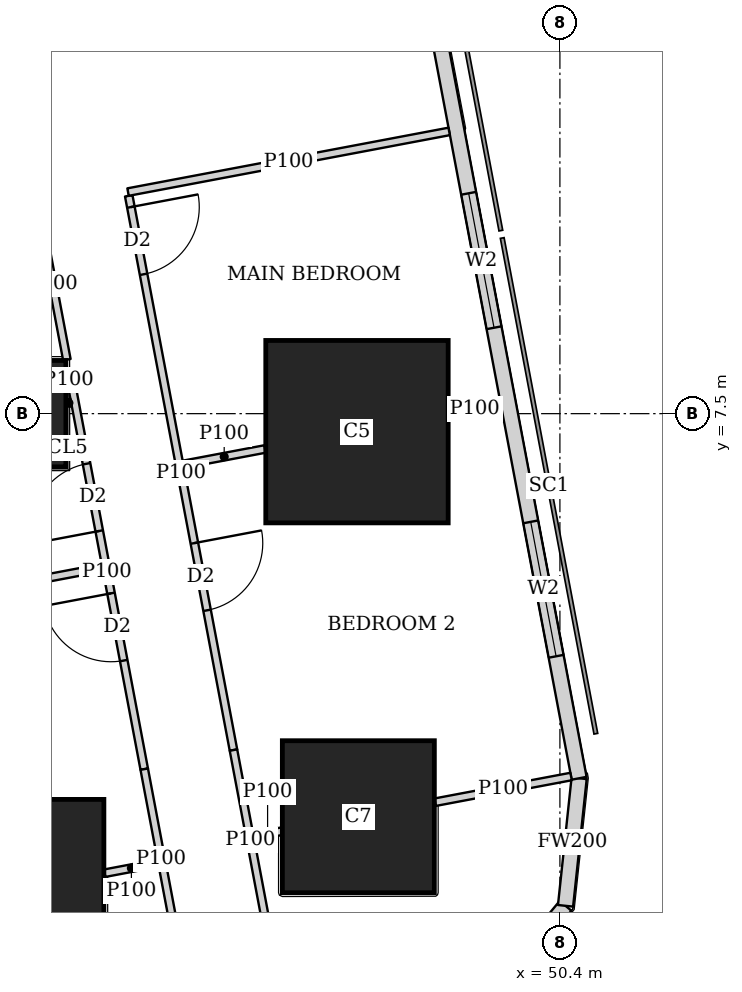
"""IFC4 building model, lengths in metres.
Left out: names, types, materials, properties, quantities, classifications, styles, units other than length and angle.
Written with IfcOpenShell. Run it as: python <this file> out.ifc"""

import sys

from ifc_helpers import new_model, si_unit, direction, frame, frame_2d, origin, origin_2d, place, context, subcontext, project, spatial, rectangle, extrude, element, fill, save


model = new_model("IFC4")
c1 = context("Model", 3, precision=1e-05, world=origin(), true_north=direction((0.0, 1.0)))
c2 = subcontext(c1, "Body", "Model", "MODEL_VIEW")
j1 = project(units=[si_unit("LENGTHUNIT", "METRE"), si_unit("PLANEANGLEUNIT", "RADIAN")], contexts=[c1])
p1 = place(None, origin())
s1 = spatial("IfcSite", under=j1, at=p1, CompositionType="ELEMENT")
p2 = place(p1, origin())
s2 = spatial("IfcBuilding", under=s1, at=p2, CompositionType="ELEMENT")
p3 = place(p2, frame((0.0, 0.0, 242.45)))
s3 = spatial("IfcBuildingStorey", under=s2, at=p3, CompositionType="ELEMENT", Elevation=242.45)
p4 = place(p3, frame((43.2, 1.225, 0.0), z_axis=(0.0, 0.0, 1.0), x_axis=(1.0, 0.0, 0.0)))
e1 = element("IfcColumn", 1, at=p4, inside=s3, PredefinedType="COLUMN", context=c2, shape_type="SweptSolid", body=[
    extrude(rectangle(XDim=2.4, YDim=2.4, at=origin_2d()), origin(), (0.0, 0.0, 1.0), 3.75),
])
p5 = place(p3, frame((47.748, 2.197, 0.0), z_axis=(0.0, 0.0, 1.0), x_axis=(1.0, 0.0, 0.0)))
e2 = element("IfcColumn", 2, at=p5, inside=s3, PredefinedType="COLUMN", context=c2, shape_type="SweptSolid", body=[
    extrude(rectangle(XDim=2.0, YDim=2.0, at=origin_2d()), origin(), (0.0, 0.0, 1.0), 3.75),
])
p6 = place(p3, frame((43.2, 7.5, 0.0), z_axis=(0.0, 0.0, 1.0), x_axis=(1.0, 0.0, 0.0)))
e3 = element("IfcColumn", 3, at=p6, inside=s3, PredefinedType="COLUMN", context=c2, shape_type="SweptSolid", body=[
    extrude(rectangle(XDim=1.4, YDim=1.4, at=origin_2d()), origin(), (0.0, 0.0, 1.0), 3.75),
])
p7 = place(p3, frame((47.73, 7.263, 0.0), z_axis=(0.0, 0.0, 1.0), x_axis=(1.0, 0.0, 0.0)))
e4 = element("IfcColumn", 4, at=p7, inside=s3, PredefinedType="COLUMN", context=c2, shape_type="SweptSolid", body=[
    extrude(rectangle(XDim=2.4, YDim=2.4, at=origin_2d()), origin(), (0.0, 0.0, 1.0), 3.75),
])
p8 = place(p3, frame((49.407, -0.263, 0.0), z_axis=(0.0, 0.0, 1.0), x_axis=(0.638042593423, 0.770001070764, 0.0)))
e5 = element("IfcWall", 5, at=p8, inside=s3, PredefinedType="SOLIDWALL", context=c2, shape_type="SweptSolid", body=[
    extrude(rectangle(XDim=1.673, YDim=0.2, at=frame_2d((0.836, 0.0))), origin(), (0.0, 0.0, 1.0), 3.45),
])
p9 = place(p3, frame((50.474, 1.025, 0.0), z_axis=(0.0, 0.0, 1.0), x_axis=(0.106047815515, 0.994361031429, 0.0)))
e6 = element("IfcWall", 6, at=p9, inside=s3, PredefinedType="SOLIDWALL", context=c2, shape_type="SweptSolid", body=[
    extrude(rectangle(XDim=1.688, YDim=0.2, at=frame_2d((0.844, 0.0))), origin(), (0.0, 0.0, 1.0), 3.45),
])
p10 = place(p3, frame((50.653, 2.703, 0.0), z_axis=(0.0, 0.0, 1.0), x_axis=(-0.185612026696, 0.982623109613, 0.0)))
e7 = element("IfcWall", 7, at=p10, inside=s3, PredefinedType="SOLIDWALL", context=c2, shape_type="SweptSolid", body=[
    extrude(rectangle(XDim=41.393, YDim=0.2, at=frame_2d((20.697, 0.0))), origin(), (0.0, 0.0, 1.0), 3.45),
])
p11 = place(p10, frame((1.633, 0.0, 0.9)))
e8 = element("IfcOpeningElement", 8, at=p11, cuts=e7, PredefinedType="OPENING", context=c2, shape_type="SweptSolid", body=[
    extrude(rectangle(XDim=1.8, YDim=1.5, at=frame_2d((0.9, 0.75))), frame((0.0, 0.11, 0.0), z_axis=(0.0, -1.0, 0.0), x_axis=(1.0, 0.0, 0.0)), (0.0, 0.0, 1.0), 0.22),
])
p12 = place(p10, frame((6.032, 0.0, 0.9)))
e9 = element("IfcOpeningElement", 9, at=p12, cuts=e7, PredefinedType="OPENING", context=c2, shape_type="SweptSolid", body=[
    extrude(rectangle(XDim=1.8, YDim=1.5, at=frame_2d((0.9, 0.75))), frame((0.0, 0.11, 0.0), z_axis=(0.0, -1.0, 0.0), x_axis=(1.0, 0.0, 0.0)), (0.0, 0.0, 1.0), 0.22),
])
p13 = place(p10, frame((9.848, 0.0, 0.9)))
e10 = element("IfcOpeningElement", 10, at=p13, cuts=e7, PredefinedType="OPENING", context=c2, shape_type="SweptSolid", body=[
    extrude(rectangle(XDim=1.8, YDim=1.5, at=frame_2d((0.9, 0.75))), frame((0.0, 0.11, 0.0), z_axis=(0.0, -1.0, 0.0), x_axis=(1.0, 0.0, 0.0)), (0.0, 0.0, 1.0), 0.22),
])
p14 = place(p10, frame((13.664, 0.0, 0.9)))
e11 = element("IfcOpeningElement", 11, at=p14, cuts=e7, PredefinedType="OPENING", context=c2, shape_type="SweptSolid", body=[
    extrude(rectangle(XDim=1.8, YDim=1.5, at=frame_2d((0.9, 0.75))), frame((0.0, 0.11, 0.0), z_axis=(0.0, -1.0, 0.0), x_axis=(1.0, 0.0, 0.0)), (0.0, 0.0, 1.0), 0.22),
])
p15 = place(p10, frame((17.481, 0.0, 0.9)))
e12 = element("IfcOpeningElement", 12, at=p15, cuts=e7, PredefinedType="OPENING", context=c2, shape_type="SweptSolid", body=[
    extrude(rectangle(XDim=1.8, YDim=1.5, at=frame_2d((0.9, 0.75))), frame((0.0, 0.11, 0.0), z_axis=(0.0, -1.0, 0.0), x_axis=(1.0, 0.0, 0.0)), (0.0, 0.0, 1.0), 0.22),
])
p16 = place(p10, frame((21.297, 0.0, 0.9)))
e13 = element("IfcOpeningElement", 13, at=p16, cuts=e7, PredefinedType="OPENING", context=c2, shape_type="SweptSolid", body=[
    extrude(rectangle(XDim=1.8, YDim=1.5, at=frame_2d((0.9, 0.75))), frame((0.0, 0.11, 0.0), z_axis=(0.0, -1.0, 0.0), x_axis=(1.0, 0.0, 0.0)), (0.0, 0.0, 1.0), 0.22),
])
p17 = place(p10, frame((25.113, 0.0, 0.9)))
e14 = element("IfcOpeningElement", 14, at=p17, cuts=e7, PredefinedType="OPENING", context=c2, shape_type="SweptSolid", body=[
    extrude(rectangle(XDim=1.8, YDim=1.5, at=frame_2d((0.9, 0.75))), frame((0.0, 0.11, 0.0), z_axis=(0.0, -1.0, 0.0), x_axis=(1.0, 0.0, 0.0)), (0.0, 0.0, 1.0), 0.22),
])
p18 = place(p10, frame((28.93, 0.0, 0.9)))
e15 = element("IfcOpeningElement", 15, at=p18, cuts=e7, PredefinedType="OPENING", context=c2, shape_type="SweptSolid", body=[
    extrude(rectangle(XDim=1.8, YDim=1.5, at=frame_2d((0.9, 0.75))), frame((0.0, 0.11, 0.0), z_axis=(0.0, -1.0, 0.0), x_axis=(1.0, 0.0, 0.0)), (0.0, 0.0, 1.0), 0.22),
])
p19 = place(p10, frame((32.746, 0.0, 0.9)))
e16 = element("IfcOpeningElement", 16, at=p19, cuts=e7, PredefinedType="OPENING", context=c2, shape_type="SweptSolid", body=[
    extrude(rectangle(XDim=1.8, YDim=1.5, at=frame_2d((0.9, 0.75))), frame((0.0, 0.11, 0.0), z_axis=(0.0, -1.0, 0.0), x_axis=(1.0, 0.0, 0.0)), (0.0, 0.0, 1.0), 0.22),
])
p20 = place(p10, frame((36.481, 0.0, 0.9)))
e17 = element("IfcOpeningElement", 17, at=p20, cuts=e7, PredefinedType="OPENING", context=c2, shape_type="SweptSolid", body=[
    extrude(rectangle(XDim=1.8, YDim=1.5, at=frame_2d((0.9, 0.75))), frame((0.0, 0.11, 0.0), z_axis=(0.0, -1.0, 0.0), x_axis=(1.0, 0.0, 0.0)), (0.0, 0.0, 1.0), 0.22),
])
p21 = place(p3, frame((44.727, 10.366, 0.0), z_axis=(0.0, 0.0, 1.0), x_axis=(0.185678775129, -0.982610498858, 0.0)))
e18 = element("IfcWall", 18, at=p21, inside=s3, PredefinedType="PARTITIONING", context=c2, shape_type="SweptSolid", body=[
    extrude(rectangle(XDim=7.421, YDim=0.1, at=frame_2d((3.71, 0.0))), origin(), (0.0, 0.0, 1.0), 3.45),
])
p22 = place(p21, frame((0.151, 0.0, 0.0)))
e19 = element("IfcOpeningElement", 19, at=p22, cuts=e18, PredefinedType="OPENING", context=c2, shape_type="SweptSolid", body=[
    extrude(rectangle(XDim=0.9, YDim=2.1, at=frame_2d((0.45, 1.05))), frame((0.0, 0.06, 0.0), z_axis=(0.0, -1.0, 0.0), x_axis=(1.0, 0.0, 0.0)), (0.0, 0.0, 1.0), 0.12),
])
p23 = place(p21, frame((4.65, 0.0, 0.0)))
e20 = element("IfcOpeningElement", 20, at=p23, cuts=e18, PredefinedType="OPENING", context=c2, shape_type="SweptSolid", body=[
    extrude(rectangle(XDim=0.9, YDim=2.1, at=frame_2d((0.45, 1.05))), frame((0.0, 0.06, 0.0), z_axis=(0.0, -1.0, 0.0), x_axis=(1.0, 0.0, 0.0)), (0.0, 0.0, 1.0), 0.12),
])
p24 = place(p3, frame((46.105, 3.074, 0.0), z_axis=(0.0, 0.0, 1.0), x_axis=(0.185631845838, -0.982619365681, 0.0)))
e21 = element("IfcWall", 21, at=p24, inside=s3, PredefinedType="PARTITIONING", context=c2, shape_type="SweptSolid", body=[
    extrude(rectangle(XDim=2.403, YDim=0.1, at=frame_2d((1.201, 0.0))), origin(), (0.0, 0.0, 1.0), 2.0),
])
p25 = place(p3, frame((43.539, 10.192, 0.0), z_axis=(0.0, 0.0, 1.0), x_axis=(0.185443145218, -0.982654995353, 0.0)))
e22 = element("IfcWall", 22, at=p25, inside=s3, PredefinedType="PARTITIONING", context=c2, shape_type="SweptSolid", body=[
    extrude(rectangle(XDim=2.017, YDim=0.1, at=frame_2d((1.008, 0.0))), origin(), (0.0, 0.0, 1.0), 3.45),
])
p26 = place(p3, frame((43.949, 8.02, 0.0), z_axis=(0.0, 0.0, 1.0), x_axis=(0.185656792073, -0.982614652627, 0.0)))
e23 = element("IfcWall", 23, at=p26, inside=s3, PredefinedType="PARTITIONING", context=c2, shape_type="SweptSolid", body=[
    extrude(rectangle(XDim=5.289, YDim=0.1, at=frame_2d((2.645, 0.0))), origin(), (0.0, 0.0, 1.0), 3.45),
])
p27 = place(p26, frame((1.2, 0.0, 0.0)))
e24 = element("IfcOpeningElement", 24, at=p27, cuts=e23, PredefinedType="OPENING", context=c2, shape_type="SweptSolid", body=[
    extrude(rectangle(XDim=0.9, YDim=2.1, at=frame_2d((0.45, 1.05))), frame((0.0, 0.06, 0.0), z_axis=(0.0, -1.0, 0.0), x_axis=(1.0, 0.0, 0.0)), (0.0, 0.0, 1.0), 0.12),
])
p28 = place(p26, frame((2.935, 0.0, 0.0)))
e25 = element("IfcOpeningElement", 25, at=p28, cuts=e23, PredefinedType="OPENING", context=c2, shape_type="SweptSolid", body=[
    extrude(rectangle(XDim=0.9, YDim=2.1, at=frame_2d((0.45, 1.05))), frame((0.0, 0.06, 0.0), z_axis=(0.0, -1.0, 0.0), x_axis=(1.0, 0.0, 0.0)), (0.0, 0.0, 1.0), 0.12),
])
p29 = place(p3, frame((44.931, 2.823, 0.0), z_axis=(0.0, 0.0, 1.0), x_axis=(0.185631845838, -0.982619365681, 0.0)))
e26 = element("IfcWall", 26, at=p29, inside=s3, PredefinedType="PARTITIONING", context=c2, shape_type="SweptSolid", body=[
    extrude(rectangle(XDim=2.403, YDim=0.1, at=frame_2d((1.201, 0.0))), origin(), (0.0, 0.0, 1.0), 2.0),
])
p30 = place(p3, frame((48.943, 11.213, 0.0), z_axis=(0.0, 0.0, 1.0), x_axis=(-0.982633535512, -0.185556823879, 0.0)))
e27 = element("IfcWall", 27, at=p30, inside=s3, PredefinedType="PARTITIONING", context=c2, shape_type="SweptSolid", body=[
    extrude(rectangle(XDim=4.3, YDim=0.1, at=frame_2d((2.15, 0.0))), origin(), (0.0, 0.0, 1.0), 2.0),
])
p31 = place(p3, frame((49.622, 7.62, 0.0), z_axis=(0.0, 0.0, 1.0), x_axis=(-0.98254419619, -0.186029305578, 0.0)))
e28 = element("IfcWall", 28, at=p31, inside=s3, PredefinedType="PARTITIONING", context=c2, shape_type="SweptSolid", body=[
    extrude(rectangle(XDim=0.694, YDim=0.1, at=frame_2d((0.347, 0.0))), origin(), (0.0, 0.0, 1.0), 3.45),
])
p32 = place(p3, frame((46.52, 7.035, 0.0), z_axis=(0.0, 0.0, 1.0), x_axis=(-0.982620932907, -0.185623549726, 0.0)))
e29 = element("IfcWall", 29, at=p32, inside=s3, PredefinedType="PARTITIONING", context=c2, shape_type="SweptSolid", body=[
    extrude(rectangle(XDim=1.093, YDim=0.1, at=frame_2d((0.546, 0.0))), origin(), (0.0, 0.0, 1.0), 3.45),
])
p33 = place(p3, frame((50.547, 2.726, 0.0), z_axis=(0.0, 0.0, 1.0), x_axis=(-0.982603988143, -0.185713226471, 0.0)))
e30 = element("IfcWall", 30, at=p33, inside=s3, PredefinedType="PARTITIONING", context=c2, shape_type="SweptSolid", body=[
    extrude(rectangle(XDim=1.821, YDim=0.1, at=frame_2d((0.91, 0.0))), origin(), (0.0, 0.0, 1.0), 2.0),
])
p34 = place(p3, frame((46.738, 2.006, 0.0), z_axis=(0.0, 0.0, 1.0), x_axis=(-0.982820466874, -0.184564161994, 0.0)))
e31 = element("IfcWall", 31, at=p34, inside=s3, PredefinedType="PARTITIONING", context=c2, shape_type="SweptSolid", body=[
    extrude(rectangle(XDim=0.374, YDim=0.1, at=frame_2d((0.187, 0.0))), origin(), (0.0, 0.0, 1.0), 2.0),
])
p35 = place(p3, frame((43.969, 7.646, 0.0), z_axis=(0.0, 0.0, 1.0), x_axis=(-0.983147034646, -0.182816597351, 0.0)))
e32 = element("IfcWall", 32, at=p35, inside=s3, PredefinedType="PARTITIONING", context=c2, shape_type="SweptSolid", body=[
    extrude(rectangle(XDim=0.06, YDim=0.1, at=frame_2d((0.03, 0.0))), origin(), (0.0, 0.0, 1.0), 3.45),
])
p36 = place(p3, frame((45.114, 1.587, 0.0), z_axis=(0.0, 0.0, 1.0), x_axis=(-0.982671022916, -0.185358195723, 0.0)))
e33 = element("IfcWall", 33, at=p36, inside=s3, PredefinedType="PARTITIONING", context=c2, shape_type="SweptSolid", body=[
    extrude(rectangle(XDim=0.717, YDim=0.1, at=frame_2d((0.358, 0.0))), origin(), (0.0, 0.0, 1.0), 2.0),
])
p37 = place(p3, frame((44.379, 5.474, 0.0), z_axis=(0.0, 0.0, 1.0), x_axis=(-0.982607026909, -0.185697147715, 0.0)))
e34 = element("IfcWall", 34, at=p37, inside=s3, PredefinedType="PARTITIONING", context=c2, shape_type="SweptSolid", body=[
    extrude(rectangle(XDim=3.275, YDim=0.1, at=frame_2d((1.637, 0.0))), origin(), (0.0, 0.0, 1.0), 3.45),
])
p38 = place(p11, origin())
e35 = element("IfcWindow", 35, at=p38, inside=s3, PartitioningType="SINGLE_PANEL", PredefinedType="WINDOW", context=c2, shape_type="SweptSolid", body=[
    extrude(rectangle(XDim=1.8, YDim=1.5, at=frame_2d((0.9, 0.75))), frame((0.0, 0.03, 0.0), z_axis=(0.0, -1.0, 0.0), x_axis=(1.0, 0.0, 0.0)), (0.0, 0.0, 1.0), 0.06),
])
fill(e8, e35)
p39 = place(p12, origin())
e36 = element("IfcWindow", 36, at=p39, inside=s3, PartitioningType="SINGLE_PANEL", PredefinedType="WINDOW", context=c2, shape_type="SweptSolid", body=[
    extrude(rectangle(XDim=1.8, YDim=1.5, at=frame_2d((0.9, 0.75))), frame((0.0, 0.03, 0.0), z_axis=(0.0, -1.0, 0.0), x_axis=(1.0, 0.0, 0.0)), (0.0, 0.0, 1.0), 0.06),
])
fill(e9, e36)
p40 = place(p22, origin())
e37 = element("IfcDoor", 37, at=p40, inside=s3, OperationType="SINGLE_SWING_LEFT", PredefinedType="DOOR", context=c2, shape_type="SweptSolid", body=[
    extrude(rectangle(XDim=0.9, YDim=2.1, at=frame_2d((0.45, 1.05))), frame((0.0, 0.025, 0.0), z_axis=(0.0, -1.0, 0.0), x_axis=(1.0, 0.0, 0.0)), (0.0, 0.0, 1.0), 0.05),
])
fill(e19, e37)
p41 = place(p23, origin())
e38 = element("IfcDoor", 38, at=p41, inside=s3, OperationType="SINGLE_SWING_LEFT", PredefinedType="DOOR", context=c2, shape_type="SweptSolid", body=[
    extrude(rectangle(XDim=0.9, YDim=2.1, at=frame_2d((0.45, 1.05))), frame((0.0, 0.025, 0.0), z_axis=(0.0, -1.0, 0.0), x_axis=(1.0, 0.0, 0.0)), (0.0, 0.0, 1.0), 0.05),
])
fill(e20, e38)
p42 = place(p27, origin())
e39 = element("IfcDoor", 39, at=p42, inside=s3, OperationType="SINGLE_SWING_LEFT", PredefinedType="DOOR", context=c2, shape_type="SweptSolid", body=[
    extrude(rectangle(XDim=0.9, YDim=2.1, at=frame_2d((0.45, 1.05))), frame((0.0, 0.025, 0.0), z_axis=(0.0, -1.0, 0.0), x_axis=(1.0, 0.0, 0.0)), (0.0, 0.0, 1.0), 0.05),
])
fill(e24, e39)
p43 = place(p28, origin())
e40 = element("IfcDoor", 40, at=p43, inside=s3, OperationType="SINGLE_SWING_RIGHT", PredefinedType="DOOR", context=c2, shape_type="SweptSolid", body=[
    extrude(rectangle(XDim=0.9, YDim=2.1, at=frame_2d((0.45, 1.05))), frame((0.0, 0.025, 0.0), z_axis=(0.0, -1.0, 0.0), x_axis=(1.0, 0.0, 0.0)), (0.0, 0.0, 1.0), 0.05),
])
fill(e25, e40)
save(model, sys.argv[1])
